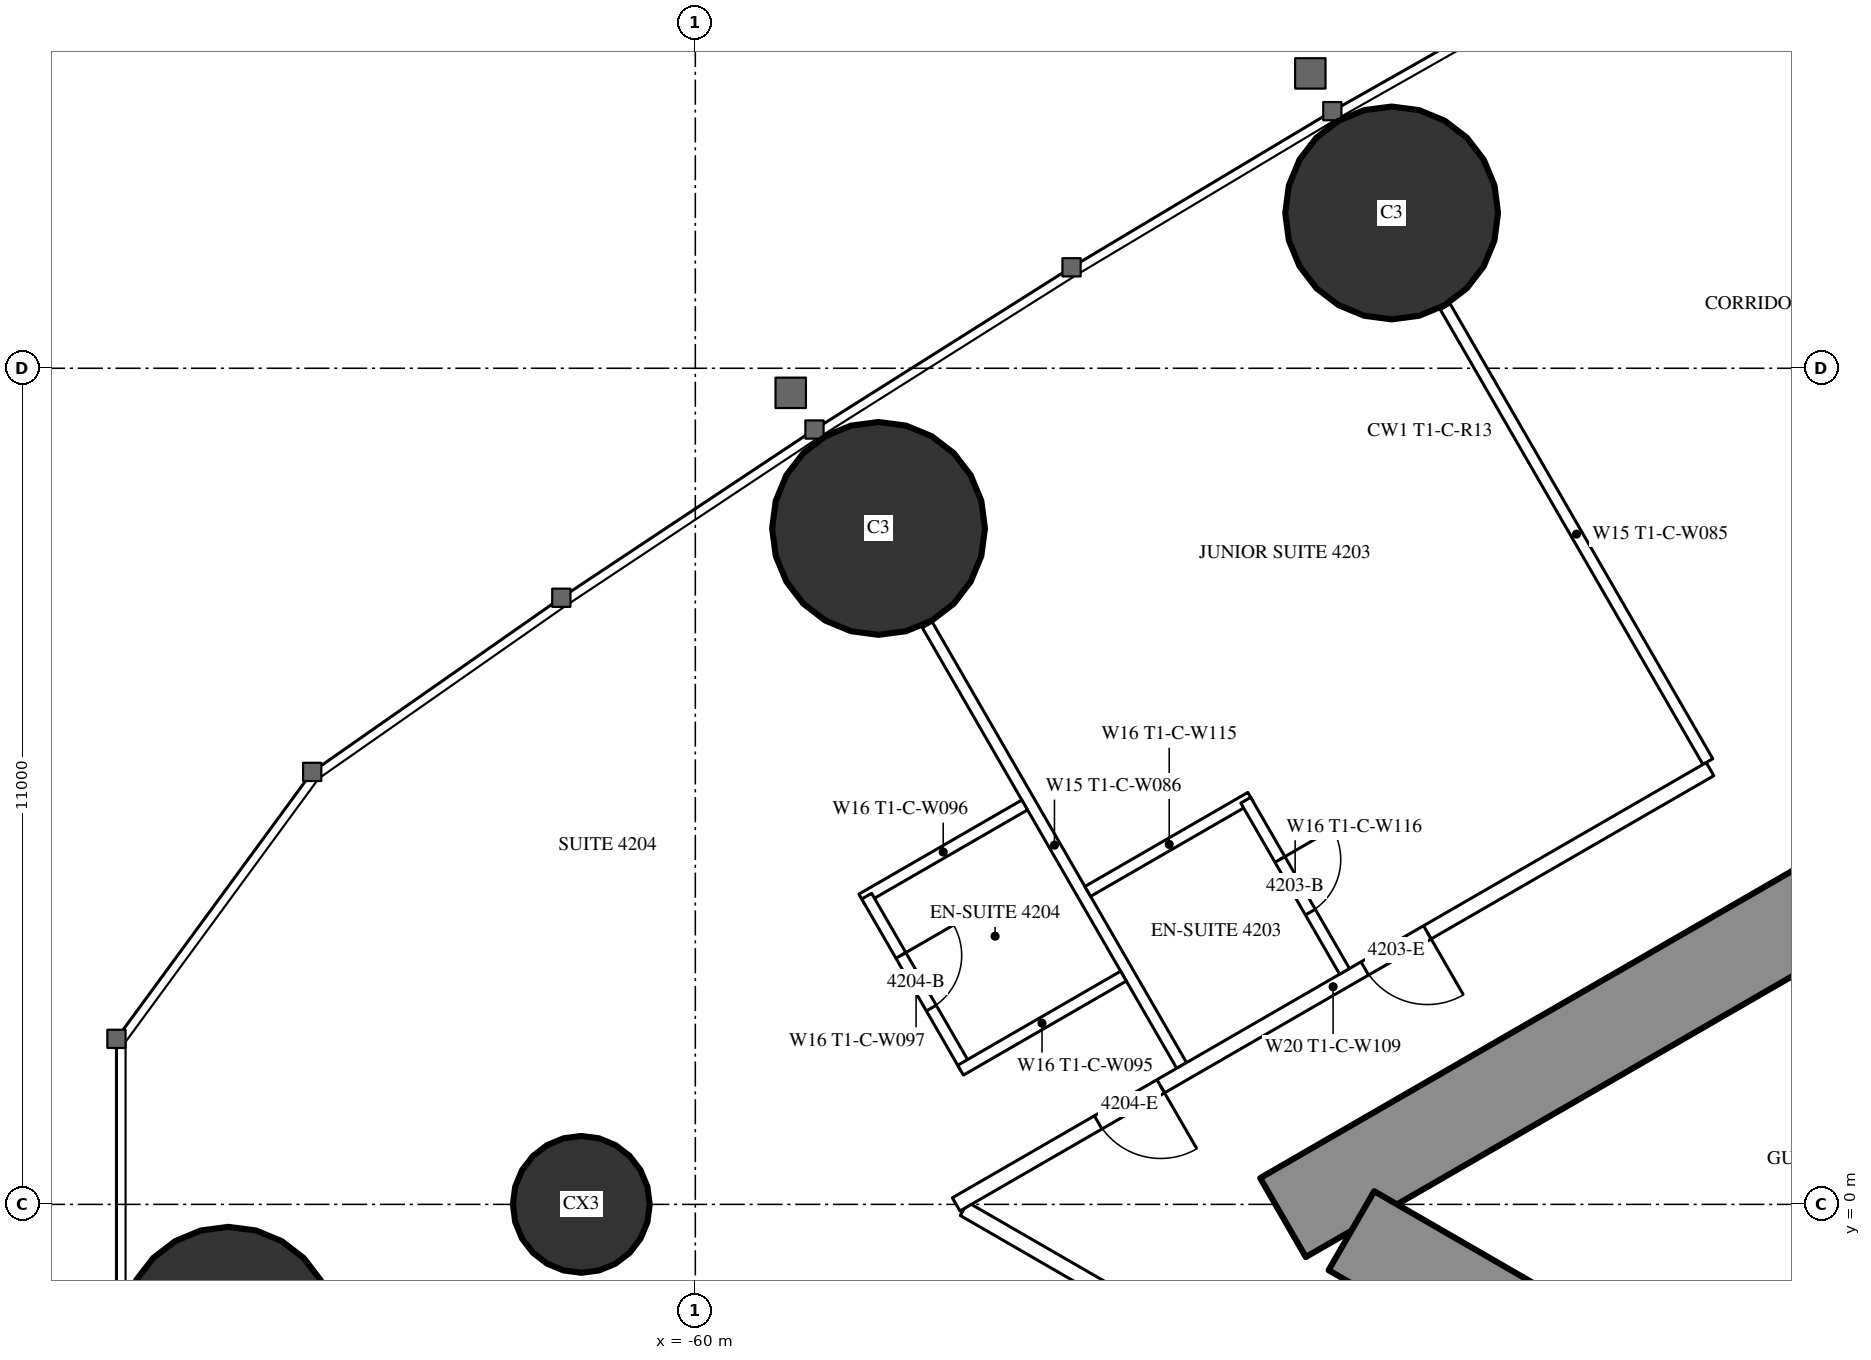
"""IFC4 building model, lengths in metres.
Left out: names, types, materials, properties, quantities, classifications, styles, units other than length and angle.
Written with IfcOpenShell. Run it as: python <this file> out.ifc"""

import sys

from ifc_helpers import new_model, si_unit, direction, frame, frame_2d, origin, origin_2d, place, context, subcontext, project, spatial, rectangle, circle, extrude, element, fill, save


model = new_model("IFC4")
c1 = context("Model", 3, precision=1e-05, world=origin(), true_north=direction((0.0, 1.0)))
c2 = subcontext(c1, "Body", "Model", "MODEL_VIEW")
j1 = project(units=[si_unit("LENGTHUNIT", "METRE"), si_unit("PLANEANGLEUNIT", "RADIAN")], contexts=[c1])
p1 = place(None, origin())
s1 = spatial("IfcSite", under=j1, at=p1, CompositionType="ELEMENT")
p2 = place(p1, origin())
s2 = spatial("IfcBuilding", under=s1, at=p2, CompositionType="ELEMENT")
p3 = place(p2, frame((0.0, 0.0, 159.8)))
s3 = spatial("IfcBuildingStorey", under=s2, at=p3, CompositionType="ELEMENT", Elevation=159.8)
for number, where, z_axis, x_axis in (
    (1, (-66.143, -1.695, 0.0), (0.0, 0.0, 1.0), (1.0, 0.0, 0.0)),
    (2, (-50.839, 13.043, 0.0), (0.0, 0.0, 1.0), (1.0, 0.0, 0.0)),
    (3, (-57.59, 8.893, 0.0), (0.0, 0.0, 1.0), (1.0, 0.0, 0.0)),
):
    element("IfcColumn", number, at=place(p3, frame(where, z_axis=z_axis, x_axis=x_axis)), inside=s3, PredefinedType="COLUMN", context=c2, shape_type="SweptSolid", body=[
        extrude(circle(Radius=1.4, at=origin_2d()), origin(), (0.0, 0.0, 1.0), 3.5),
    ])
p4 = place(p3, frame((-61.5, 0.0, 0.0), z_axis=(0.0, 0.0, 1.0), x_axis=(1.0, 0.0, 0.0)))
e4 = element("IfcColumn", 4, at=p4, inside=s3, PredefinedType="COLUMN", context=c2, shape_type="SweptSolid", body=[
    extrude(circle(Radius=0.9, at=origin_2d()), origin(), (0.0, 0.0, 1.0), 3.5),
])
p5 = place(p3, frame((-27.2, 14.3, 0.0), z_axis=(0.0, 0.0, 1.0), x_axis=(-0.866026593062, -0.499997940104, 0.0)))
e5 = element("IfcWall", 5, at=p5, inside=s3, PredefinedType="SHEAR", context=c2, shape_type="SweptSolid", body=[
    extrude(rectangle(XDim=28.946, YDim=1.2, at=frame_2d((14.473, 0.0))), origin(), (0.0, 0.0, 1.0), 3.5),
])
p6 = place(p5, frame((4.6, 0.0, 0.0)))
e6 = element("IfcOpeningElement", 6, at=p6, cuts=e5, PredefinedType="OPENING", context=c2, shape_type="SweptSolid", body=[
    extrude(rectangle(XDim=1.0, YDim=2.2, at=frame_2d((0.5, 1.1))), frame((0.0, 0.61, 0.0), z_axis=(0.0, -1.0, 0.0), x_axis=(1.0, 0.0, 0.0)), (0.0, 0.0, 1.0), 1.22),
])
p7 = place(p5, frame((13.395, 0.0, 0.0)))
e7 = element("IfcOpeningElement", 7, at=p7, cuts=e5, PredefinedType="OPENING", context=c2, shape_type="SweptSolid", body=[
    extrude(rectangle(XDim=1.8, YDim=2.2, at=frame_2d((0.9, 1.1))), frame((0.0, 0.61, 0.0), z_axis=(0.0, -1.0, 0.0), x_axis=(1.0, 0.0, 0.0)), (0.0, 0.0, 1.0), 1.22),
])
p8 = place(p3, frame((-27.2, -14.3, 0.0), z_axis=(0.0, 0.0, 1.0), x_axis=(-0.866024021859, 0.500002393557, 0.0)))
e8 = element("IfcWall", 8, at=p8, inside=s3, PredefinedType="SHEAR", context=c2, shape_type="SweptSolid", body=[
    extrude(rectangle(XDim=27.907, YDim=1.2, at=frame_2d((13.954, 0.0))), origin(), (0.0, 0.0, 1.0), 3.5),
])
p9 = place(p8, frame((4.6, 0.0, 0.0)))
e9 = element("IfcOpeningElement", 9, at=p9, cuts=e8, PredefinedType="OPENING", context=c2, shape_type="SweptSolid", body=[
    extrude(rectangle(XDim=1.0, YDim=2.2, at=frame_2d((0.5, 1.1))), frame((0.0, 0.61, 0.0), z_axis=(0.0, -1.0, 0.0), x_axis=(1.0, 0.0, 0.0)), (0.0, 0.0, 1.0), 1.22),
])
p10 = place(p8, frame((13.395, 0.0, 0.0)))
e10 = element("IfcOpeningElement", 10, at=p10, cuts=e8, PredefinedType="OPENING", context=c2, shape_type="SweptSolid", body=[
    extrude(rectangle(XDim=1.8, YDim=2.2, at=frame_2d((0.9, 1.1))), frame((0.0, 0.61, 0.0), z_axis=(0.0, -1.0, 0.0), x_axis=(1.0, 0.0, 0.0)), (0.0, 0.0, 1.0), 1.22),
])
p11 = place(p3, frame((-46.679, 5.825, 0.0), z_axis=(0.0, 0.0, 1.0), x_axis=(-0.500006839597, 0.866021454905, 0.0)))
e11 = element("IfcWall", 11, at=p11, inside=s3, PredefinedType="PARTITIONING", context=c2, shape_type="SweptSolid", body=[
    extrude(rectangle(XDim=6.911, YDim=0.15, at=frame_2d((3.456, 0.0))), origin(), (0.0, 0.0, 1.0), 2.3),
])
p12 = place(p3, frame((-53.602, 1.828, 0.0), z_axis=(0.0, 0.0, 1.0), x_axis=(-0.49999191814, 0.866030069798, 0.0)))
e12 = element("IfcWall", 12, at=p12, inside=s3, PredefinedType="PARTITIONING", context=c2, shape_type="SweptSolid", body=[
    extrude(rectangle(XDim=6.692, YDim=0.15, at=frame_2d((3.346, 0.0))), origin(), (0.0, 0.0, 1.0), 2.3),
])
p13 = place(p3, frame((-44.715, -6.844, 0.0), z_axis=(0.0, 0.0, 1.0), x_axis=(-0.866025261224, 0.500000246922, 0.0)))
e13 = element("IfcWall", 13, at=p13, inside=s3, PredefinedType="PARTITIONING", context=c2, shape_type="SweptSolid", body=[
    extrude(rectangle(XDim=13.567, YDim=0.2, at=frame_2d((6.783, 0.0))), origin(), (0.0, 0.0, 1.0), 3.25),
])
p14 = place(p13, frame((10.579, 0.0, 0.0)))
e14 = element("IfcOpeningElement", 14, at=p14, cuts=e13, PredefinedType="OPENING", context=c2, shape_type="SweptSolid", body=[
    extrude(rectangle(XDim=0.95, YDim=2.2, at=frame_2d((0.475, 1.1))), frame((0.0, 0.11, 0.0), z_axis=(0.0, -1.0, 0.0), x_axis=(1.0, 0.0, 0.0)), (0.0, 0.0, 1.0), 0.22),
])
p15 = place(p13, frame((8.879, 0.0, 0.0)))
e15 = element("IfcOpeningElement", 15, at=p15, cuts=e13, PredefinedType="OPENING", context=c2, shape_type="SweptSolid", body=[
    extrude(rectangle(XDim=0.95, YDim=2.2, at=frame_2d((0.475, 1.1))), frame((0.0, 0.11, 0.0), z_axis=(0.0, -1.0, 0.0), x_axis=(1.0, 0.0, 0.0)), (0.0, 0.0, 1.0), 0.22),
])
p16 = place(p13, frame((0.5, 0.0, 0.0)))
e16 = element("IfcOpeningElement", 16, at=p16, cuts=e13, PredefinedType="OPENING", context=c2, shape_type="SweptSolid", body=[
    extrude(rectangle(XDim=1.435, YDim=2.2, at=frame_2d((0.718, 1.1))), frame((0.0, 0.11, 0.0), z_axis=(0.0, -1.0, 0.0), x_axis=(1.0, 0.0, 0.0)), (0.0, 0.0, 1.0), 0.22),
])
p17 = place(p3, frame((-46.65, 5.726, 0.0), z_axis=(0.0, 0.0, 1.0), x_axis=(-0.866027963864, -0.499995565786, 0.0)))
e17 = element("IfcWall", 17, at=p17, inside=s3, PredefinedType="PARTITIONING", context=c2, shape_type="SweptSolid", body=[
    extrude(rectangle(XDim=11.452, YDim=0.2, at=frame_2d((5.726, 0.0))), origin(), (0.0, 0.0, 1.0), 3.25),
])
p18 = place(p17, frame((4.294, 0.0, 0.0)))
e18 = element("IfcOpeningElement", 18, at=p18, cuts=e17, PredefinedType="OPENING", context=c2, shape_type="SweptSolid", body=[
    extrude(rectangle(XDim=0.95, YDim=2.2, at=frame_2d((0.475, 1.1))), frame((0.0, 0.11, 0.0), z_axis=(0.0, -1.0, 0.0), x_axis=(1.0, 0.0, 0.0)), (0.0, 0.0, 1.0), 0.22),
])
p19 = place(p17, frame((8.344, 0.0, 0.0)))
e19 = element("IfcOpeningElement", 19, at=p19, cuts=e17, PredefinedType="OPENING", context=c2, shape_type="SweptSolid", body=[
    extrude(rectangle(XDim=0.95, YDim=2.2, at=frame_2d((0.475, 1.1))), frame((0.0, 0.11, 0.0), z_axis=(0.0, -1.0, 0.0), x_axis=(1.0, 0.0, 0.0)), (0.0, 0.0, 1.0), 0.22),
])
p20 = place(p3, frame((-52.694, 5.355, 0.0), z_axis=(0.0, 0.0, 1.0), x_axis=(-0.866031185235, -0.4999899861, 0.0)))
e20 = element("IfcWall", 20, at=p20, inside=s3, PredefinedType="PARTITIONING", context=c2, shape_type="SweptSolid", body=[
    extrude(rectangle(XDim=2.475, YDim=0.15, at=frame_2d((1.238, 0.0))), origin(), (0.0, 0.0, 1.0), 3.25),
])
p21 = place(p3, frame((-51.459, 3.065, 0.0), z_axis=(0.0, 0.0, 1.0), x_axis=(-0.499936506574, 0.866062058628, 0.0)))
e21 = element("IfcWall", 21, at=p21, inside=s3, PredefinedType="PARTITIONING", context=c2, shape_type="SweptSolid", body=[
    extrude(rectangle(XDim=2.6, YDim=0.15, at=frame_2d((1.3, 0.0))), origin(), (0.0, 0.0, 1.0), 3.25),
])
p22 = place(p21, frame((0.9, 0.0, 0.0)))
e22 = element("IfcOpeningElement", 22, at=p22, cuts=e21, PredefinedType="OPENING", context=c2, shape_type="SweptSolid", body=[
    extrude(rectangle(XDim=0.8, YDim=2.2, at=frame_2d((0.4, 1.1))), frame((0.0, 0.085, 0.0), z_axis=(0.0, -1.0, 0.0), x_axis=(1.0, 0.0, 0.0)), (0.0, 0.0, 1.0), 0.17),
])
p23 = place(p3, frame((-55.667, 5.255, 0.0), z_axis=(0.0, 0.0, 1.0), x_axis=(-0.866006523861, -0.500032699561, 0.0)))
e23 = element("IfcWall", 23, at=p23, inside=s3, PredefinedType="PARTITIONING", context=c2, shape_type="SweptSolid", body=[
    extrude(rectangle(XDim=2.475, YDim=0.15, at=frame_2d((1.237, 0.0))), origin(), (0.0, 0.0, 1.0), 3.25),
])
p24 = place(p3, frame((-56.446, 1.803, 0.0), z_axis=(0.0, 0.0, 1.0), x_axis=(-0.499936506574, 0.866062058628, 0.0)))
e24 = element("IfcWall", 24, at=p24, inside=s3, PredefinedType="PARTITIONING", context=c2, shape_type="SweptSolid", body=[
    extrude(rectangle(XDim=2.6, YDim=0.15, at=frame_2d((1.3, 0.0))), origin(), (0.0, 0.0, 1.0), 3.25),
])
p25 = place(p24, frame((0.9, 0.0, 0.0)))
e25 = element("IfcOpeningElement", 25, at=p25, cuts=e24, PredefinedType="OPENING", context=c2, shape_type="SweptSolid", body=[
    extrude(rectangle(XDim=0.8, YDim=2.2, at=frame_2d((0.4, 1.1))), frame((0.0, 0.085, 0.0), z_axis=(0.0, -1.0, 0.0), x_axis=(1.0, 0.0, 0.0)), (0.0, 0.0, 1.0), 0.17),
])
p26 = place(p3, frame((-54.367, 3.003, 0.0), z_axis=(0.0, 0.0, 1.0), x_axis=(-0.866031185235, -0.4999899861, 0.0)))
e26 = element("IfcWall", 26, at=p26, inside=s3, PredefinedType="PARTITIONING", context=c2, shape_type="SweptSolid", body=[
    extrude(rectangle(XDim=2.475, YDim=0.15, at=frame_2d((1.238, 0.0))), origin(), (0.0, 0.0, 1.0), 3.25),
])
p27 = place(p22, origin())
e27 = element("IfcDoor", 27, at=p27, inside=s3, OperationType="SINGLE_SWING_RIGHT", PredefinedType="DOOR", context=c2, shape_type="SweptSolid", body=[
    extrude(rectangle(XDim=0.8, YDim=2.2, at=frame_2d((0.4, 1.1))), frame((0.0, 0.025, 0.0), z_axis=(0.0, -1.0, 0.0), x_axis=(1.0, 0.0, 0.0)), (0.0, 0.0, 1.0), 0.05),
])
fill(e22, e27)
p28 = place(p18, origin())
e28 = element("IfcDoor", 28, at=p28, inside=s3, OperationType="SINGLE_SWING_LEFT", PredefinedType="DOOR", context=c2, shape_type="SweptSolid", body=[
    extrude(rectangle(XDim=0.95, YDim=2.2, at=frame_2d((0.475, 1.1))), frame((0.0, 0.025, 0.0), z_axis=(0.0, -1.0, 0.0), x_axis=(1.0, 0.0, 0.0)), (0.0, 0.0, 1.0), 0.05),
])
fill(e18, e28)
p29 = place(p25, origin())
e29 = element("IfcDoor", 29, at=p29, inside=s3, OperationType="SINGLE_SWING_RIGHT", PredefinedType="DOOR", context=c2, shape_type="SweptSolid", body=[
    extrude(rectangle(XDim=0.8, YDim=2.2, at=frame_2d((0.4, 1.1))), frame((0.0, 0.025, 0.0), z_axis=(0.0, -1.0, 0.0), x_axis=(1.0, 0.0, 0.0)), (0.0, 0.0, 1.0), 0.05),
])
fill(e25, e29)
p30 = place(p19, origin())
e30 = element("IfcDoor", 30, at=p30, inside=s3, OperationType="SINGLE_SWING_LEFT", PredefinedType="DOOR", context=c2, shape_type="SweptSolid", body=[
    extrude(rectangle(XDim=0.95, YDim=2.2, at=frame_2d((0.475, 1.1))), frame((0.0, 0.025, 0.0), z_axis=(0.0, -1.0, 0.0), x_axis=(1.0, 0.0, 0.0)), (0.0, 0.0, 1.0), 0.05),
])
fill(e19, e30)
save(model, sys.argv[1])
